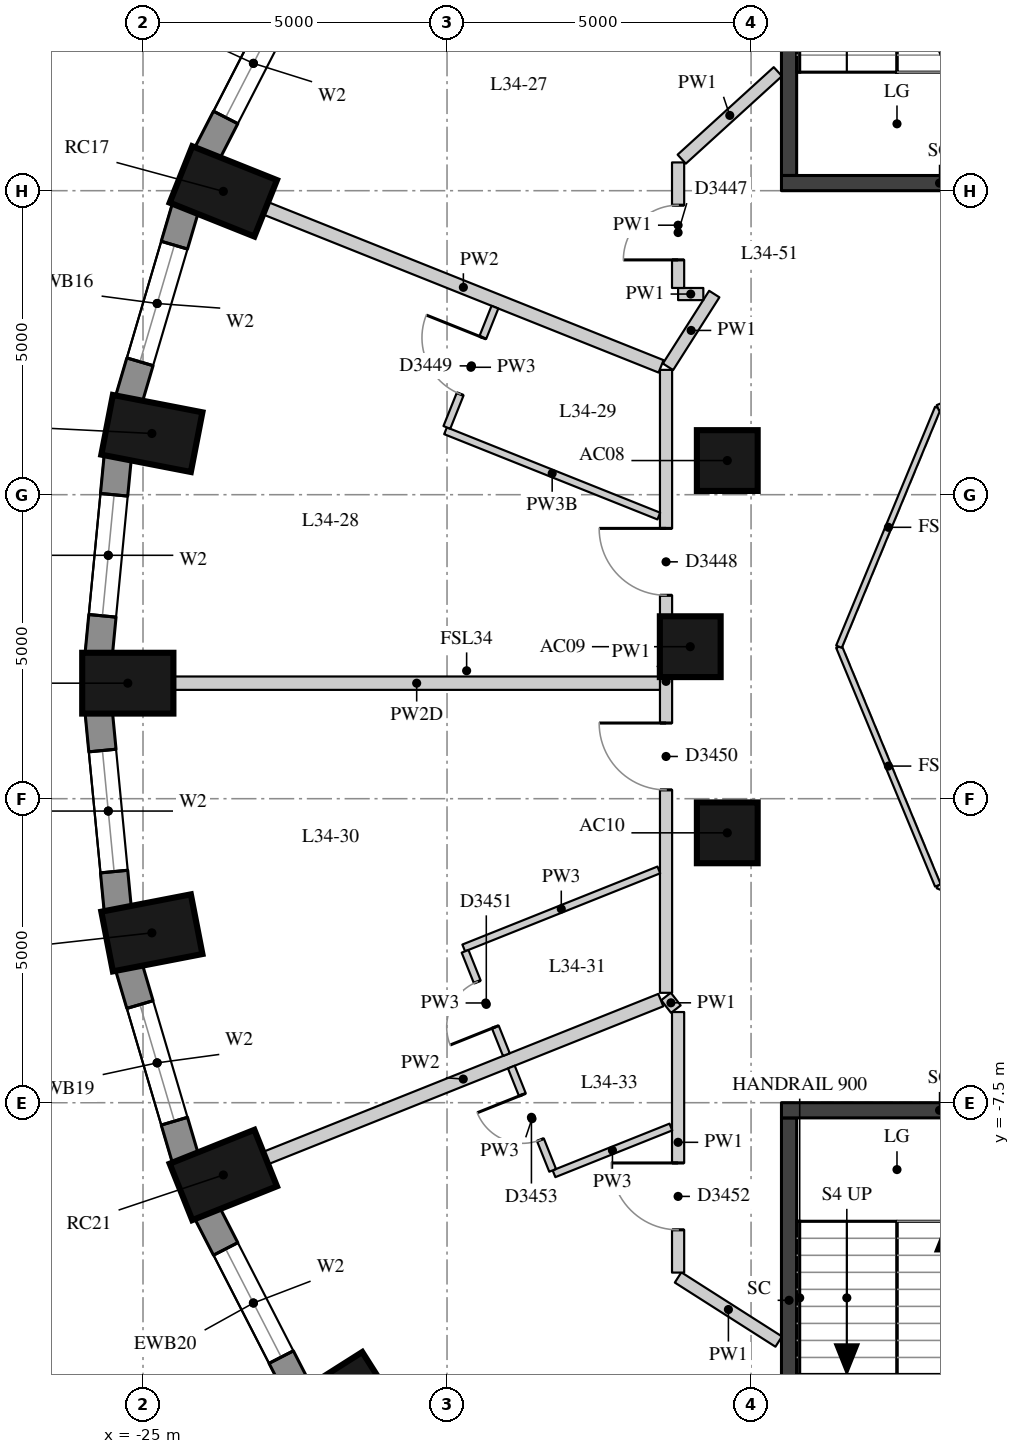
"""IFC4 building model, lengths in metres.
Left out: names, types, materials, properties, quantities, classifications, styles, units other than length and angle.
Written with IfcOpenShell. Run it as: python <this file> out.ifc"""

import sys

from ifc_helpers import new_model, si_unit, direction, frame, frame_2d, origin, origin_2d, place, context, subcontext, project, spatial, rectangle, extrude, element, fill, save


model = new_model("IFC4")
c1 = context("Model", 3, precision=1e-05, world=origin(), true_north=direction((0.0, 1.0)))
c2 = subcontext(c1, "Body", "Model", "MODEL_VIEW")
j1 = project(units=[si_unit("LENGTHUNIT", "METRE"), si_unit("PLANEANGLEUNIT", "RADIAN")], contexts=[c1])
p1 = place(None, origin())
s1 = spatial("IfcSite", under=j1, at=p1, CompositionType="ELEMENT")
p2 = place(p1, origin())
s2 = spatial("IfcBuilding", under=s1, at=p2, CompositionType="ELEMENT")
p3 = place(p2, frame((0.0, 0.0, 121.9)))
s3 = spatial("IfcBuildingStorey", under=s2, at=p3, CompositionType="ELEMENT", Elevation=121.9)
for number, where, z_axis, x_axis in (
    (1, (-23.679, 7.489, 0.0), (0.0, 0.0, 1.0), (-0.929, 0.371, 0.0)),
    (2, (-24.854, 3.507, 0.0), (0.0, 0.0, 1.0), (-0.982, 0.19, 0.0)),
    (3, (-25.25, -0.6, 0.0), (0.0, 0.0, 1.0), (-1.0, 0.0, 0.0)),
    (4, (-24.854, -4.707, 0.0), (0.0, 0.0, 1.0), (-0.982, -0.19, 0.0)),
    (5, (-23.679, -8.689, 0.0), (0.0, 0.0, 1.0), (-0.929, -0.371, 0.0)),
    (6, (-21.76, -12.425, 0.0), (0.0, 0.0, 1.0), (-0.845, -0.536, 0.0)),
):
    element("IfcColumn", number, at=place(p3, frame(where, z_axis=z_axis, x_axis=x_axis)), inside=s3, PredefinedType="COLUMN", context=c2, shape_type="SweptSolid", body=[
        extrude(rectangle(XDim=1.5, YDim=1.0, at=origin_2d()), origin(), (0.0, 0.0, 1.0), 3.3),
    ])
for number, where, z_axis, x_axis in (
    (7, (-15.391, 3.062, 0.0), (0.0, 0.0, 1.0), (1.0, 0.0, 0.0)),
    (8, (-16.0, 0.0, 0.0), (0.0, 0.0, 1.0), (1.0, 0.0, 0.0)),
    (9, (-15.391, -3.062, 0.0), (0.0, 0.0, 1.0), (1.0, 0.0, 0.0)),
):
    element("IfcColumn", number, at=place(p3, frame(where, z_axis=z_axis, x_axis=x_axis)), inside=s3, PredefinedType="COLUMN", context=c2, shape_type="SweptSolid", body=[
        extrude(rectangle(XDim=1.0, YDim=1.0, at=origin_2d()), origin(), (0.0, 0.0, 1.0), 3.3),
    ])
p4 = place(p3, frame((-22.423, 11.077, 0.0), z_axis=(0.0, 0.0, 1.0), x_axis=(-0.456828186229, -0.889554949549, 0.0)))
e10 = element("IfcWall", 10, at=p4, inside=s3, PredefinedType="SOLIDWALL", context=c2, shape_type="SweptSolid", body=[
    extrude(rectangle(XDim=3.333, YDim=0.45, at=frame_2d((1.667, 0.0))), origin(), (0.0, 0.0, 1.0), 3.02),
])
p5 = place(p4, frame((0.666, 0.0, 0.4)))
e11 = element("IfcOpeningElement", 11, at=p5, cuts=e10, PredefinedType="OPENING", context=c2, shape_type="SweptSolid", body=[
    extrude(rectangle(XDim=2.0, YDim=1.75, at=frame_2d((1.0, 0.875))), frame((0.0, 0.235, 0.0), z_axis=(0.0, -1.0, 0.0), x_axis=(1.0, 0.0, 0.0)), (0.0, 0.0, 1.0), 0.47),
])
p6 = place(p3, frame((-24.302, 7.221, 0.0), z_axis=(0.0, 0.0, 1.0), x_axis=(-0.283071248438, -0.959098883488, 0.0)))
e12 = element("IfcWall", 12, at=p6, inside=s3, PredefinedType="SOLIDWALL", context=c2, shape_type="SweptSolid", body=[
    extrude(rectangle(XDim=3.286, YDim=0.45, at=frame_2d((1.643, 0.0))), origin(), (0.0, 0.0, 1.0), 3.02),
])
p7 = place(p6, frame((0.643, 0.0, 0.4)))
e13 = element("IfcOpeningElement", 13, at=p7, cuts=e12, PredefinedType="OPENING", context=c2, shape_type="SweptSolid", body=[
    extrude(rectangle(XDim=2.0, YDim=1.75, at=frame_2d((1.0, 0.875))), frame((0.0, 0.235, 0.0), z_axis=(0.0, -1.0, 0.0), x_axis=(1.0, 0.0, 0.0)), (0.0, 0.0, 1.0), 0.47),
])
p8 = place(p3, frame((-25.415, 3.126, 0.0), z_axis=(0.0, 0.0, 1.0), x_axis=(-0.095967726544, -0.995384446062, 0.0)))
e14 = element("IfcWall", 14, at=p8, inside=s3, PredefinedType="SOLIDWALL", context=c2, shape_type="SweptSolid", body=[
    extrude(rectangle(XDim=3.261, YDim=0.45, at=frame_2d((1.631, 0.0))), origin(), (0.0, 0.0, 1.0), 3.02),
])
p9 = place(p8, frame((0.631, 0.0, 0.4)))
e15 = element("IfcOpeningElement", 15, at=p9, cuts=e14, PredefinedType="OPENING", context=c2, shape_type="SweptSolid", body=[
    extrude(rectangle(XDim=2.0, YDim=1.75, at=frame_2d((1.0, 0.875))), frame((0.0, 0.235, 0.0), z_axis=(0.0, -1.0, 0.0), x_axis=(1.0, 0.0, 0.0)), (0.0, 0.0, 1.0), 0.47),
])
p10 = place(p3, frame((-25.728, -1.08, 0.0), z_axis=(0.0, 0.0, 1.0), x_axis=(0.095967726544, -0.995384446062, 0.0)))
e16 = element("IfcWall", 16, at=p10, inside=s3, PredefinedType="SOLIDWALL", context=c2, shape_type="SweptSolid", body=[
    extrude(rectangle(XDim=3.261, YDim=0.45, at=frame_2d((1.631, 0.0))), origin(), (0.0, 0.0, 1.0), 3.02),
])
p11 = place(p10, frame((0.631, 0.0, 0.4)))
e17 = element("IfcOpeningElement", 17, at=p11, cuts=e16, PredefinedType="OPENING", context=c2, shape_type="SweptSolid", body=[
    extrude(rectangle(XDim=2.0, YDim=1.75, at=frame_2d((1.0, 0.875))), frame((0.0, 0.235, 0.0), z_axis=(0.0, -1.0, 0.0), x_axis=(1.0, 0.0, 0.0)), (0.0, 0.0, 1.0), 0.47),
])
p12 = place(p3, frame((-25.232, -5.269, 0.0), z_axis=(0.0, 0.0, 1.0), x_axis=(0.283051078697, -0.959104836214, 0.0)))
e18 = element("IfcWall", 18, at=p12, inside=s3, PredefinedType="SOLIDWALL", context=c2, shape_type="SweptSolid", body=[
    extrude(rectangle(XDim=3.286, YDim=0.45, at=frame_2d((1.643, 0.0))), origin(), (0.0, 0.0, 1.0), 3.02),
])
p13 = place(p12, frame((0.643, 0.0, 0.4)))
e19 = element("IfcOpeningElement", 19, at=p13, cuts=e18, PredefinedType="OPENING", context=c2, shape_type="SweptSolid", body=[
    extrude(rectangle(XDim=2.0, YDim=1.75, at=frame_2d((1.0, 0.875))), frame((0.0, 0.235, 0.0), z_axis=(0.0, -1.0, 0.0), x_axis=(1.0, 0.0, 0.0)), (0.0, 0.0, 1.0), 0.47),
])
p14 = place(p3, frame((-23.945, -9.312, 0.0), z_axis=(0.0, 0.0, 1.0), x_axis=(0.456828186229, -0.889554949549, 0.0)))
e20 = element("IfcWall", 20, at=p14, inside=s3, PredefinedType="SOLIDWALL", context=c2, shape_type="SweptSolid", body=[
    extrude(rectangle(XDim=3.333, YDim=0.45, at=frame_2d((1.667, 0.0))), origin(), (0.0, 0.0, 1.0), 3.02),
])
p15 = place(p14, frame((0.666, 0.0, 0.4)))
e21 = element("IfcOpeningElement", 21, at=p15, cuts=e20, PredefinedType="OPENING", context=c2, shape_type="SweptSolid", body=[
    extrude(rectangle(XDim=2.0, YDim=1.75, at=frame_2d((1.0, 0.875))), frame((0.0, 0.235, 0.0), z_axis=(0.0, -1.0, 0.0), x_axis=(1.0, 0.0, 0.0)), (0.0, 0.0, 1.0), 0.47),
])
p16 = place(p3, frame((-14.375, 7.75, -0.28), z_axis=(0.0, 0.0, 1.0), x_axis=(0.0, 1.0, 0.0)))
e22 = element("IfcWall", 22, at=p16, inside=s3, PredefinedType="SHEAR", context=c2, shape_type="SweptSolid", body=[
    extrude(rectangle(XDim=6.0, YDim=0.25, at=frame_2d((3.0, 0.0))), origin(), (0.0, 0.0, 1.0), 3.3),
])
p17 = place(p3, frame((-14.5, 7.625, -0.28), z_axis=(0.0, 0.0, 1.0), x_axis=(1.0, 0.0, 0.0)))
e23 = element("IfcWall", 23, at=p17, inside=s3, PredefinedType="SHEAR", context=c2, shape_type="SweptSolid", body=[
    extrude(rectangle(XDim=5.2, YDim=0.25, at=frame_2d((2.6, 0.0))), origin(), (0.0, 0.0, 1.0), 3.3),
])
p18 = place(p3, frame((-14.375, -13.75, -0.28), z_axis=(0.0, 0.0, 1.0), x_axis=(0.0, 1.0, 0.0)))
e24 = element("IfcWall", 24, at=p18, inside=s3, PredefinedType="SHEAR", context=c2, shape_type="SweptSolid", body=[
    extrude(rectangle(XDim=6.0, YDim=0.25, at=frame_2d((3.0, 0.0))), origin(), (0.0, 0.0, 1.0), 3.3),
])
p19 = place(p3, frame((-14.5, -7.625, -0.28), z_axis=(0.0, 0.0, 1.0), x_axis=(1.0, 0.0, 0.0)))
e25 = element("IfcWall", 25, at=p19, inside=s3, PredefinedType="SHEAR", context=c2, shape_type="SweptSolid", body=[
    extrude(rectangle(XDim=5.2, YDim=0.25, at=frame_2d((2.6, 0.0))), origin(), (0.0, 0.0, 1.0), 3.3),
])
p20 = place(p3, frame((-14.545, -11.429, 0.0), z_axis=(0.0, 0.0, 1.0), x_axis=(-0.843261732334, 0.537503163507, 0.0)))
e26 = element("IfcWall", 26, at=p20, inside=s3, PredefinedType="PARTITIONING", context=c2, shape_type="SweptSolid", body=[
    extrude(rectangle(XDim=1.963, YDim=0.2, at=frame_2d((0.981, 0.0))), origin(), (0.0, 0.0, 1.0), 3.02),
])
p21 = place(p3, frame((-16.2, -10.294, 0.0), z_axis=(0.0, 0.0, 1.0), x_axis=(0.0, 1.0, 0.0)))
e27 = element("IfcWall", 27, at=p21, inside=s3, PredefinedType="PARTITIONING", context=c2, shape_type="SweptSolid", body=[
    extrude(rectangle(XDim=4.285, YDim=0.2, at=frame_2d((2.143, 0.0))), origin(), (0.0, 0.0, 1.0), 3.02),
])
p22 = place(p21, frame((0.703, 0.0, 0.0)))
e28 = element("IfcOpeningElement", 28, at=p22, cuts=e27, PredefinedType="OPENING", context=c2, shape_type="SweptSolid", body=[
    extrude(rectangle(XDim=1.1, YDim=2.1, at=frame_2d((0.55, 1.05))), frame((0.0, 0.11, 0.0), z_axis=(0.0, -1.0, 0.0), x_axis=(1.0, 0.0, 0.0)), (0.0, 0.0, 1.0), 0.22),
])
p23 = place(p3, frame((-16.237, -5.961, 0.0), z_axis=(0.0, 0.0, 1.0), x_axis=(-0.61310674242, 0.790000077468, 0.0)))
e29 = element("IfcWall", 29, at=p23, inside=s3, PredefinedType="PARTITIONING", context=c2, shape_type="SweptSolid", body=[
    extrude(rectangle(XDim=0.264, YDim=0.2, at=frame_2d((0.132, 0.0))), origin(), (0.0, 0.0, 1.0), 3.02),
])
p24 = place(p3, frame((-16.398, -5.693, 0.0), z_axis=(0.0, 0.0, 1.0), x_axis=(0.0, 1.0, 0.0)))
e30 = element("IfcWall", 30, at=p24, inside=s3, PredefinedType="PARTITIONING", context=c2, shape_type="SweptSolid", body=[
    extrude(rectangle(XDim=10.246, YDim=0.2, at=frame_2d((5.123, 0.0))), origin(), (0.0, 0.0, 1.0), 3.02),
])
p25 = place(p24, frame((6.539, 0.0, 0.0)))
e31 = element("IfcOpeningElement", 31, at=p25, cuts=e30, PredefinedType="OPENING", context=c2, shape_type="SweptSolid", body=[
    extrude(rectangle(XDim=1.1, YDim=2.1, at=frame_2d((0.55, 1.05))), frame((0.0, 0.11, 0.0), z_axis=(0.0, -1.0, 0.0), x_axis=(1.0, 0.0, 0.0)), (0.0, 0.0, 1.0), 0.22),
])
p26 = place(p24, frame((3.337, 0.0, 0.0)))
e32 = element("IfcOpeningElement", 32, at=p26, cuts=e30, PredefinedType="OPENING", context=c2, shape_type="SweptSolid", body=[
    extrude(rectangle(XDim=1.1, YDim=2.1, at=frame_2d((0.55, 1.05))), frame((0.0, 0.11, 0.0), z_axis=(0.0, -1.0, 0.0), x_axis=(1.0, 0.0, 0.0)), (0.0, 0.0, 1.0), 0.22),
])
p27 = place(p3, frame((-16.366, 4.604, 0.0), z_axis=(0.0, 0.0, 1.0), x_axis=(0.536775234189, 0.843725279911, 0.0)))
e33 = element("IfcWall", 33, at=p27, inside=s3, PredefinedType="PARTITIONING", context=c2, shape_type="SweptSolid", body=[
    extrude(rectangle(XDim=1.418, YDim=0.2, at=frame_2d((0.709, 0.0))), origin(), (0.0, 0.0, 1.0), 3.02),
])
p28 = place(p3, frame((-15.785, 5.8, 0.0), z_axis=(0.0, 0.0, 1.0), x_axis=(-1.0, 0.0, 0.0)))
e34 = element("IfcWall", 34, at=p28, inside=s3, PredefinedType="PARTITIONING", context=c2, shape_type="SweptSolid", body=[
    extrude(rectangle(XDim=0.415, YDim=0.2, at=frame_2d((0.208, 0.0))), origin(), (0.0, 0.0, 1.0), 3.02),
])
p29 = place(p3, frame((-16.2, 5.9, 0.0), z_axis=(0.0, 0.0, 1.0), x_axis=(0.0, 1.0, 0.0)))
e35 = element("IfcWall", 35, at=p29, inside=s3, PredefinedType="PARTITIONING", context=c2, shape_type="SweptSolid", body=[
    extrude(rectangle(XDim=2.065, YDim=0.2, at=frame_2d((1.032, 0.0))), origin(), (0.0, 0.0, 1.0), 3.02),
])
p30 = place(p29, frame((0.462, 0.0, 0.0)))
e36 = element("IfcOpeningElement", 36, at=p30, cuts=e35, PredefinedType="OPENING", context=c2, shape_type="SweptSolid", body=[
    extrude(rectangle(XDim=0.9, YDim=2.1, at=frame_2d((0.45, 1.05))), frame((0.0, 0.11, 0.0), z_axis=(0.0, -1.0, 0.0), x_axis=(1.0, 0.0, 0.0)), (0.0, 0.0, 1.0), 0.22),
])
p31 = place(p3, frame((-16.14, 8.019, 0.0), z_axis=(0.0, 0.0, 1.0), x_axis=(0.739392120684, 0.673275049197, 0.0)))
e37 = element("IfcWall", 37, at=p31, inside=s3, PredefinedType="PARTITIONING", context=c2, shape_type="SweptSolid", body=[
    extrude(rectangle(XDim=2.138, YDim=0.2, at=frame_2d((1.069, 0.0))), origin(), (0.0, 0.0, 1.0), 3.02),
])
p32 = place(p3, frame((-22.983, 7.21, 0.0), z_axis=(0.0, 0.0, 1.0), x_axis=(0.928548801607, -0.371210348771, 0.0)))
e38 = element("IfcWall", 38, at=p32, inside=s3, PredefinedType="PARTITIONING", context=c2, shape_type="SweptSolid", body=[
    extrude(rectangle(XDim=7.003, YDim=0.22, at=frame_2d((3.501, 0.0))), origin(), (0.0, 0.0, 1.0), 3.02),
])
p33 = place(p3, frame((-24.5, -0.6, 0.0), z_axis=(0.0, 0.0, 1.0), x_axis=(1.0, 0.0, 0.0)))
e39 = element("IfcWall", 39, at=p33, inside=s3, PredefinedType="PARTITIONING", context=c2, shape_type="SweptSolid", body=[
    extrude(rectangle(XDim=8.002, YDim=0.22, at=frame_2d((4.001, 0.0))), origin(), (0.0, 0.0, 1.0), 2.47),
])
p34 = place(p3, frame((-22.983, -8.41, 0.0), z_axis=(0.0, 0.0, 1.0), x_axis=(0.928551252469, 0.371204218105, 0.0)))
e40 = element("IfcWall", 40, at=p34, inside=s3, PredefinedType="PARTITIONING", context=c2, shape_type="SweptSolid", body=[
    extrude(rectangle(XDim=6.999, YDim=0.22, at=frame_2d((3.499, 0.0))), origin(), (0.0, 0.0, 1.0), 3.02),
])
p35 = place(p3, frame((-16.517, 2.148, 0.0), z_axis=(0.0, 0.0, 1.0), x_axis=(-0.928534615374, 0.37124583237, 0.0)))
e41 = element("IfcWall", 41, at=p35, inside=s3, PredefinedType="PARTITIONING", context=c2, shape_type="SweptSolid", body=[
    extrude(rectangle(XDim=3.778, YDim=0.12, at=frame_2d((1.889, 0.0))), origin(), (0.0, 0.0, 1.0), 2.47),
])
p36 = place(p3, frame((-16.517, -3.672, 0.0), z_axis=(0.0, 0.0, 1.0), x_axis=(-0.928554629191, -0.371195771268, 0.0)))
e42 = element("IfcWall", 42, at=p36, inside=s3, PredefinedType="PARTITIONING", context=c2, shape_type="SweptSolid", body=[
    extrude(rectangle(XDim=3.456, YDim=0.12, at=frame_2d((1.728, 0.0))), origin(), (0.0, 0.0, 1.0), 3.02),
])
p37 = place(p3, frame((-16.319, -7.9, 0.0), z_axis=(0.0, 0.0, 1.0), x_axis=(-0.92852548478, -0.371268668371, 0.0)))
e43 = element("IfcWall", 43, at=p37, inside=s3, PredefinedType="PARTITIONING", context=c2, shape_type="SweptSolid", body=[
    extrude(rectangle(XDim=2.07, YDim=0.12, at=frame_2d((1.035, 0.0))), origin(), (0.0, 0.0, 1.0), 3.02),
])
p38 = place(p3, frame((-20.003, 3.607, 0.0), z_axis=(0.0, 0.0, 1.0), x_axis=(0.371351153758, 0.928492498948, 0.0)))
e44 = element("IfcWall", 44, at=p38, inside=s3, PredefinedType="PARTITIONING", context=c2, shape_type="SweptSolid", body=[
    extrude(rectangle(XDim=2.13, YDim=0.12, at=frame_2d((1.065, 0.0))), origin(), (0.0, 0.0, 1.0), 3.02),
])
p39 = place(p38, frame((0.59, 0.0, 0.0)))
e45 = element("IfcOpeningElement", 45, at=p39, cuts=e44, PredefinedType="OPENING", context=c2, shape_type="SweptSolid", body=[
    extrude(rectangle(XDim=1.0, YDim=2.1, at=frame_2d((0.5, 1.05))), frame((0.0, 0.07, 0.0), z_axis=(0.0, -1.0, 0.0), x_axis=(1.0, 0.0, 0.0)), (0.0, 0.0, 1.0), 0.14),
])
p40 = place(p3, frame((-19.703, -5.01, 0.0), z_axis=(0.0, 0.0, 1.0), x_axis=(0.371229680537, -0.928541073022, 0.0)))
e46 = element("IfcWall", 46, at=p40, inside=s3, PredefinedType="PARTITIONING", context=c2, shape_type="SweptSolid", body=[
    extrude(rectangle(XDim=1.83, YDim=0.12, at=frame_2d((0.915, 0.0))), origin(), (0.0, 0.0, 1.0), 3.02),
])
p41 = place(p40, frame((0.54, 0.0, 0.0)))
e47 = element("IfcOpeningElement", 47, at=p41, cuts=e46, PredefinedType="OPENING", context=c2, shape_type="SweptSolid", body=[
    extrude(rectangle(XDim=0.8, YDim=2.1, at=frame_2d((0.4, 1.05))), frame((0.0, 0.07, 0.0), z_axis=(0.0, -1.0, 0.0), x_axis=(1.0, 0.0, 0.0)), (0.0, 0.0, 1.0), 0.14),
])
p42 = place(p3, frame((-18.263, -8.613, 0.0), z_axis=(0.0, 0.0, 1.0), x_axis=(-0.371229680537, 0.928541073022, 0.0)))
e48 = element("IfcWall", 48, at=p42, inside=s3, PredefinedType="PARTITIONING", context=c2, shape_type="SweptSolid", body=[
    extrude(rectangle(XDim=1.83, YDim=0.12, at=frame_2d((0.915, 0.0))), origin(), (0.0, 0.0, 1.0), 3.02),
])
p43 = place(p42, frame((0.54, 0.0, 0.0)))
e49 = element("IfcOpeningElement", 49, at=p43, cuts=e48, PredefinedType="OPENING", context=c2, shape_type="SweptSolid", body=[
    extrude(rectangle(XDim=0.8, YDim=2.1, at=frame_2d((0.4, 1.05))), frame((0.0, 0.07, 0.0), z_axis=(0.0, -1.0, 0.0), x_axis=(1.0, 0.0, 0.0)), (0.0, 0.0, 1.0), 0.14),
])
for number, where, z_axis, x_axis in (
    (50, (-8.0, -5.554, 0.0), (0.0, 0.0, 1.0), (-0.924, 0.383, 0.0)),
    (51, (-11.927, -3.927, 0.0), (0.0, 0.0, 1.0), (-0.383, 0.924, 0.0)),
    (52, (-13.554, 0.0, 0.0), (0.0, 0.0, 1.0), (0.383, 0.924, 0.0)),
    (53, (-11.927, 3.927, 0.0), (0.0, 0.0, 1.0), (0.924, 0.383, 0.0)),
):
    element("IfcWall", number, at=place(p3, frame(where, z_axis=z_axis, x_axis=x_axis)), inside=s3, PredefinedType="PARTITIONING", context=c2, shape_type="SweptSolid", body=[
        extrude(rectangle(XDim=4.251, YDim=0.1, at=frame_2d((2.125, 0.0))), origin(), (0.0, 0.0, 1.0), 3.02),
    ])
p44 = place(p5, origin())
e54 = element("IfcWindow", 54, at=p44, inside=s3, PartitioningType="SINGLE_PANEL", PredefinedType="WINDOW", context=c2, shape_type="SweptSolid", body=[
    extrude(rectangle(XDim=2.0, YDim=1.75, at=frame_2d((1.0, 0.875))), frame((0.0, 0.035, 0.0), z_axis=(0.0, -1.0, 0.0), x_axis=(1.0, 0.0, 0.0)), (0.0, 0.0, 1.0), 0.06),
])
fill(e11, e54)
p45 = place(p7, origin())
e55 = element("IfcWindow", 55, at=p45, inside=s3, PartitioningType="SINGLE_PANEL", PredefinedType="WINDOW", context=c2, shape_type="SweptSolid", body=[
    extrude(rectangle(XDim=2.0, YDim=1.75, at=frame_2d((1.0, 0.875))), frame((0.0, 0.035, 0.0), z_axis=(0.0, -1.0, 0.0), x_axis=(1.0, 0.0, 0.0)), (0.0, 0.0, 1.0), 0.06),
])
fill(e13, e55)
p46 = place(p9, origin())
e56 = element("IfcWindow", 56, at=p46, inside=s3, PartitioningType="SINGLE_PANEL", PredefinedType="WINDOW", context=c2, shape_type="SweptSolid", body=[
    extrude(rectangle(XDim=2.0, YDim=1.75, at=frame_2d((1.0, 0.875))), frame((0.0, 0.035, 0.0), z_axis=(0.0, -1.0, 0.0), x_axis=(1.0, 0.0, 0.0)), (0.0, 0.0, 1.0), 0.06),
])
fill(e15, e56)
p47 = place(p11, origin())
e57 = element("IfcWindow", 57, at=p47, inside=s3, PartitioningType="SINGLE_PANEL", PredefinedType="WINDOW", context=c2, shape_type="SweptSolid", body=[
    extrude(rectangle(XDim=2.0, YDim=1.75, at=frame_2d((1.0, 0.875))), frame((0.0, 0.035, 0.0), z_axis=(0.0, -1.0, 0.0), x_axis=(1.0, 0.0, 0.0)), (0.0, 0.0, 1.0), 0.06),
])
fill(e17, e57)
p48 = place(p13, origin())
e58 = element("IfcWindow", 58, at=p48, inside=s3, PartitioningType="SINGLE_PANEL", PredefinedType="WINDOW", context=c2, shape_type="SweptSolid", body=[
    extrude(rectangle(XDim=2.0, YDim=1.75, at=frame_2d((1.0, 0.875))), frame((0.0, 0.035, 0.0), z_axis=(0.0, -1.0, 0.0), x_axis=(1.0, 0.0, 0.0)), (0.0, 0.0, 1.0), 0.06),
])
fill(e19, e58)
p49 = place(p15, origin())
e59 = element("IfcWindow", 59, at=p49, inside=s3, PartitioningType="SINGLE_PANEL", PredefinedType="WINDOW", context=c2, shape_type="SweptSolid", body=[
    extrude(rectangle(XDim=2.0, YDim=1.75, at=frame_2d((1.0, 0.875))), frame((0.0, 0.035, 0.0), z_axis=(0.0, -1.0, 0.0), x_axis=(1.0, 0.0, 0.0)), (0.0, 0.0, 1.0), 0.06),
])
fill(e21, e59)
p50 = place(p30, origin())
e60 = element("IfcDoor", 60, at=p50, inside=s3, OperationType="SINGLE_SWING_LEFT", PredefinedType="DOOR", context=c2, shape_type="SweptSolid", body=[
    extrude(rectangle(XDim=0.9, YDim=2.1, at=frame_2d((0.45, 1.05))), frame((0.0, 0.025, 0.0), z_axis=(0.0, -1.0, 0.0), x_axis=(1.0, 0.0, 0.0)), (0.0, 0.0, 1.0), 0.05),
])
fill(e36, e60)
p51 = place(p25, origin())
e61 = element("IfcDoor", 61, at=p51, inside=s3, OperationType="SINGLE_SWING_RIGHT", PredefinedType="DOOR", context=c2, shape_type="SweptSolid", body=[
    extrude(rectangle(XDim=1.1, YDim=2.1, at=frame_2d((0.55, 1.05))), frame((0.0, 0.025, 0.0), z_axis=(0.0, -1.0, 0.0), x_axis=(1.0, 0.0, 0.0)), (0.0, 0.0, 1.0), 0.05),
])
fill(e31, e61)
p52 = place(p39, origin())
e62 = element("IfcDoor", 62, at=p52, inside=s3, OperationType="SINGLE_SWING_RIGHT", PredefinedType="DOOR", context=c2, shape_type="SweptSolid", body=[
    extrude(rectangle(XDim=1.0, YDim=2.1, at=frame_2d((0.5, 1.05))), frame((0.0, 0.025, 0.0), z_axis=(0.0, -1.0, 0.0), x_axis=(1.0, 0.0, 0.0)), (0.0, 0.0, 1.0), 0.05),
])
fill(e45, e62)
p53 = place(p26, origin())
e63 = element("IfcDoor", 63, at=p53, inside=s3, OperationType="SINGLE_SWING_RIGHT", PredefinedType="DOOR", context=c2, shape_type="SweptSolid", body=[
    extrude(rectangle(XDim=1.1, YDim=2.1, at=frame_2d((0.55, 1.05))), frame((0.0, 0.025, 0.0), z_axis=(0.0, -1.0, 0.0), x_axis=(1.0, 0.0, 0.0)), (0.0, 0.0, 1.0), 0.05),
])
fill(e32, e63)
p54 = place(p41, origin())
e64 = element("IfcDoor", 64, at=p54, inside=s3, OperationType="SINGLE_SWING_LEFT", PredefinedType="DOOR", context=c2, shape_type="SweptSolid", body=[
    extrude(rectangle(XDim=0.8, YDim=2.1, at=frame_2d((0.4, 1.05))), frame((0.0, 0.025, 0.0), z_axis=(0.0, -1.0, 0.0), x_axis=(1.0, 0.0, 0.0)), (0.0, 0.0, 1.0), 0.05),
])
fill(e47, e64)
p55 = place(p22, origin())
e65 = element("IfcDoor", 65, at=p55, inside=s3, OperationType="SINGLE_SWING_RIGHT", PredefinedType="DOOR", context=c2, shape_type="SweptSolid", body=[
    extrude(rectangle(XDim=1.1, YDim=2.1, at=frame_2d((0.55, 1.05))), frame((0.0, 0.025, 0.0), z_axis=(0.0, -1.0, 0.0), x_axis=(1.0, 0.0, 0.0)), (0.0, 0.0, 1.0), 0.05),
])
fill(e28, e65)
p56 = place(p43, origin())
e66 = element("IfcDoor", 66, at=p56, inside=s3, OperationType="SINGLE_SWING_RIGHT", PredefinedType="DOOR", context=c2, shape_type="SweptSolid", body=[
    extrude(rectangle(XDim=0.8, YDim=2.1, at=frame_2d((0.4, 1.05))), frame((0.0, 0.025, 0.0), z_axis=(0.0, -1.0, 0.0), x_axis=(1.0, 0.0, 0.0)), (0.0, 0.0, 1.0), 0.05),
])
fill(e49, e66)
save(model, sys.argv[1])
